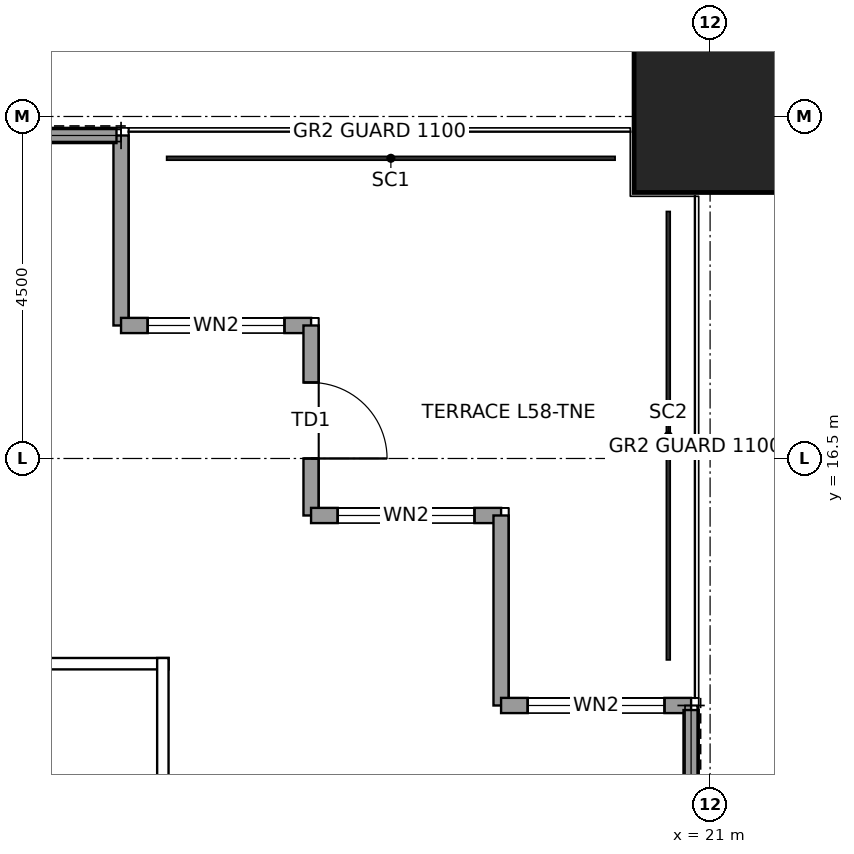
"""IFC4 building model, lengths in metres.
Left out: names, types, materials, properties, quantities, classifications, styles, units other than length and angle.
Written with IfcOpenShell. Run it as: python <this file> out.ifc"""

import sys

from ifc_helpers import new_model, si_unit, direction, frame, frame_2d, origin, origin_2d, place, context, subcontext, project, spatial, rectangle, hollow_rectangle, extrude, element, fill, save


model = new_model("IFC4")
c1 = context("Model", 3, precision=1e-05, world=origin(), true_north=direction((0.0, 1.0)))
c2 = subcontext(c1, "Body", "Model", "MODEL_VIEW")
j1 = project(units=[si_unit("LENGTHUNIT", "METRE"), si_unit("PLANEANGLEUNIT", "RADIAN")], contexts=[c1])
p1 = place(None, origin())
s1 = spatial("IfcSite", under=j1, at=p1, CompositionType="ELEMENT")
p2 = place(p1, origin())
s2 = spatial("IfcBuilding", under=s1, at=p2, CompositionType="ELEMENT")
p3 = place(p2, frame((0.0, 0.0, 267.9)))
s3 = spatial("IfcBuildingStorey", under=s2, at=p3, CompositionType="ELEMENT", Elevation=267.9)
p4 = place(p3, frame((21.0, 21.0, 0.0), z_axis=(0.0, 0.0, 1.0), x_axis=(1.0, 0.0, 0.0)))
e1 = element("IfcColumn", 1, at=p4, inside=s3, PredefinedType="COLUMN", context=c2, shape_type="SweptSolid", body=[
    extrude(hollow_rectangle(XDim=2.0, YDim=2.0, WallThickness=0.095, at=origin_2d()), origin(), (0.0, 0.0, 1.0), 4.0),
])
p5 = place(p3, frame((13.25, 20.75, 0.0), z_axis=(0.0, 0.0, 1.0), x_axis=(0.0, -1.0, 0.0)))
e2 = element("IfcWall", 2, at=p5, inside=s3, PredefinedType="SOLIDWALL", context=c2, shape_type="SweptSolid", body=[
    extrude(rectangle(XDim=2.5, YDim=0.2, at=frame_2d((1.25, 0.0))), origin(), (0.0, 0.0, 1.0), 3.85),
])
p6 = place(p3, frame((13.25, 18.25, 0.0), z_axis=(0.0, 0.0, 1.0), x_axis=(1.0, 0.0, 0.0)))
e3 = element("IfcWall", 3, at=p6, inside=s3, PredefinedType="SOLIDWALL", context=c2, shape_type="SweptSolid", body=[
    extrude(rectangle(XDim=2.5, YDim=0.2, at=frame_2d((1.25, 0.0))), origin(), (0.0, 0.0, 1.0), 3.85),
])
p7 = place(p6, frame((0.35, 0.0, 0.3)))
e4 = element("IfcOpeningElement", 4, at=p7, cuts=e3, PredefinedType="OPENING", context=c2, shape_type="SweptSolid", body=[
    extrude(rectangle(XDim=1.8, YDim=2.4, at=frame_2d((0.9, 1.2))), frame((0.0, 0.11, 0.0), z_axis=(0.0, -1.0, 0.0), x_axis=(1.0, 0.0, 0.0)), (0.0, 0.0, 1.0), 0.22),
])
p8 = place(p3, frame((15.75, 18.25, 0.0), z_axis=(0.0, 0.0, 1.0), x_axis=(0.0, -1.0, 0.0)))
e5 = element("IfcWall", 5, at=p8, inside=s3, PredefinedType="SOLIDWALL", context=c2, shape_type="SweptSolid", body=[
    extrude(rectangle(XDim=2.5, YDim=0.2, at=frame_2d((1.25, 0.0))), origin(), (0.0, 0.0, 1.0), 3.317),
])
p9 = place(p8, frame((0.75, 0.0, 0.0)))
e6 = element("IfcOpeningElement", 6, at=p9, cuts=e5, PredefinedType="OPENING", context=c2, shape_type="SweptSolid", body=[
    extrude(rectangle(XDim=1.0, YDim=2.4, at=frame_2d((0.5, 1.2))), frame((0.0, 0.11, 0.0), z_axis=(0.0, -1.0, 0.0), x_axis=(1.0, 0.0, 0.0)), (0.0, 0.0, 1.0), 0.22),
])
p10 = place(p3, frame((15.75, 15.75, 0.0), z_axis=(0.0, 0.0, 1.0), x_axis=(1.0, 0.0, 0.0)))
e7 = element("IfcWall", 7, at=p10, inside=s3, PredefinedType="SOLIDWALL", context=c2, shape_type="SweptSolid", body=[
    extrude(rectangle(XDim=2.5, YDim=0.2, at=frame_2d((1.25, 0.0))), origin(), (0.0, 0.0, 1.0), 3.85),
])
p11 = place(p10, frame((0.35, 0.0, 0.3)))
e8 = element("IfcOpeningElement", 8, at=p11, cuts=e7, PredefinedType="OPENING", context=c2, shape_type="SweptSolid", body=[
    extrude(rectangle(XDim=1.8, YDim=2.4, at=frame_2d((0.9, 1.2))), frame((0.0, 0.11, 0.0), z_axis=(0.0, -1.0, 0.0), x_axis=(1.0, 0.0, 0.0)), (0.0, 0.0, 1.0), 0.22),
])
p12 = place(p3, frame((18.25, 15.75, 0.0), z_axis=(0.0, 0.0, 1.0), x_axis=(0.0, -1.0, 0.0)))
e9 = element("IfcWall", 9, at=p12, inside=s3, PredefinedType="SOLIDWALL", context=c2, shape_type="SweptSolid", body=[
    extrude(rectangle(XDim=2.5, YDim=0.2, at=frame_2d((1.25, 0.0))), origin(), (0.0, 0.0, 1.0), 3.85),
])
p13 = place(p3, frame((18.25, 13.25, 0.0), z_axis=(0.0, 0.0, 1.0), x_axis=(1.0, 0.0, 0.0)))
e10 = element("IfcWall", 10, at=p13, inside=s3, PredefinedType="SOLIDWALL", context=c2, shape_type="SweptSolid", body=[
    extrude(rectangle(XDim=2.5, YDim=0.2, at=frame_2d((1.25, 0.0))), origin(), (0.0, 0.0, 1.0), 3.85),
])
p14 = place(p13, frame((0.35, 0.0, 0.3)))
e11 = element("IfcOpeningElement", 11, at=p14, cuts=e10, PredefinedType="OPENING", context=c2, shape_type="SweptSolid", body=[
    extrude(rectangle(XDim=1.8, YDim=2.4, at=frame_2d((0.9, 1.2))), frame((0.0, 0.11, 0.0), z_axis=(0.0, -1.0, 0.0), x_axis=(1.0, 0.0, 0.0)), (0.0, 0.0, 1.0), 0.22),
])
for number, where, z_axis, x_axis in (
    (12, (10.405, 20.75, 0.0), (0.0, 0.0, 1.0), (1.0, 0.0, 0.0)),
    (13, (20.75, 13.19, 0.0), (0.0, 0.0, 1.0), (0.0, -1.0, 0.0)),
):
    element("IfcWall", number, at=place(p3, frame(where, z_axis=z_axis, x_axis=x_axis)), inside=s3, PredefinedType="SOLIDWALL", context=c2, shape_type="SweptSolid", body=[
        extrude(rectangle(XDim=2.785, YDim=0.2, at=frame_2d((1.393, 0.0))), origin(), (0.0, 0.0, 1.0), 3.85),
    ])
p15 = place(p3, frame((-13.875, 13.8, 0.0), z_axis=(0.0, 0.0, 1.0), x_axis=(1.0, 0.0, 0.0)))
e14 = element("IfcWall", 14, at=p15, inside=s3, PredefinedType="PARTITIONING", context=c2, shape_type="SweptSolid", body=[
    extrude(rectangle(XDim=27.75, YDim=0.15, at=frame_2d((13.875, 0.0))), origin(), (0.0, 0.0, 1.0), 3.85),
])
p16 = place(p15, frame((20.275, 0.0, 0.0)))
e15 = element("IfcOpeningElement", 15, at=p16, cuts=e14, PredefinedType="OPENING", context=c2, shape_type="SweptSolid", body=[
    extrude(rectangle(XDim=1.0, YDim=2.4, at=frame_2d((0.5, 1.2))), frame((0.0, 0.085, 0.0), z_axis=(0.0, -1.0, 0.0), x_axis=(1.0, 0.0, 0.0)), (0.0, 0.0, 1.0), 0.17),
])
p17 = place(p3, frame((13.8, 2.425, 0.0), z_axis=(0.0, 0.0, 1.0), x_axis=(0.0, 1.0, 0.0)))
e16 = element("IfcWall", 16, at=p17, inside=s3, PredefinedType="PARTITIONING", context=c2, shape_type="SweptSolid", body=[
    extrude(rectangle(XDim=11.45, YDim=0.15, at=frame_2d((5.725, 0.0))), origin(), (0.0, 0.0, 1.0), 3.85),
])
p18 = place(p7, origin())
e17 = element("IfcWindow", 17, at=p18, inside=s3, PartitioningType="SINGLE_PANEL", PredefinedType="WINDOW", context=c2, shape_type="SweptSolid", body=[
    extrude(rectangle(XDim=1.8, YDim=2.4, at=frame_2d((0.9, 1.2))), frame((0.0, 0.03, 0.0), z_axis=(0.0, -1.0, 0.0), x_axis=(1.0, 0.0, 0.0)), (0.0, 0.0, 1.0), 0.06),
])
fill(e4, e17)
p19 = place(p9, origin())
e18 = element("IfcDoor", 18, at=p19, inside=s3, OperationType="SINGLE_SWING_RIGHT", PredefinedType="DOOR", context=c2, shape_type="SweptSolid", body=[
    extrude(rectangle(XDim=1.0, YDim=2.4, at=frame_2d((0.5, 1.2))), frame((0.0, 0.025, 0.0), z_axis=(0.0, -1.0, 0.0), x_axis=(1.0, 0.0, 0.0)), (0.0, 0.0, 1.0), 0.05),
])
fill(e6, e18)
p20 = place(p11, origin())
e19 = element("IfcWindow", 19, at=p20, inside=s3, PartitioningType="SINGLE_PANEL", PredefinedType="WINDOW", context=c2, shape_type="SweptSolid", body=[
    extrude(rectangle(XDim=1.8, YDim=2.4, at=frame_2d((0.9, 1.2))), frame((0.0, 0.03, 0.0), z_axis=(0.0, -1.0, 0.0), x_axis=(1.0, 0.0, 0.0)), (0.0, 0.0, 1.0), 0.06),
])
fill(e8, e19)
p21 = place(p14, origin())
e20 = element("IfcWindow", 20, at=p21, inside=s3, PartitioningType="SINGLE_PANEL", PredefinedType="WINDOW", context=c2, shape_type="SweptSolid", body=[
    extrude(rectangle(XDim=1.8, YDim=2.4, at=frame_2d((0.9, 1.2))), frame((0.0, 0.03, 0.0), z_axis=(0.0, -1.0, 0.0), x_axis=(1.0, 0.0, 0.0)), (0.0, 0.0, 1.0), 0.06),
])
fill(e11, e20)
save(model, sys.argv[1])
